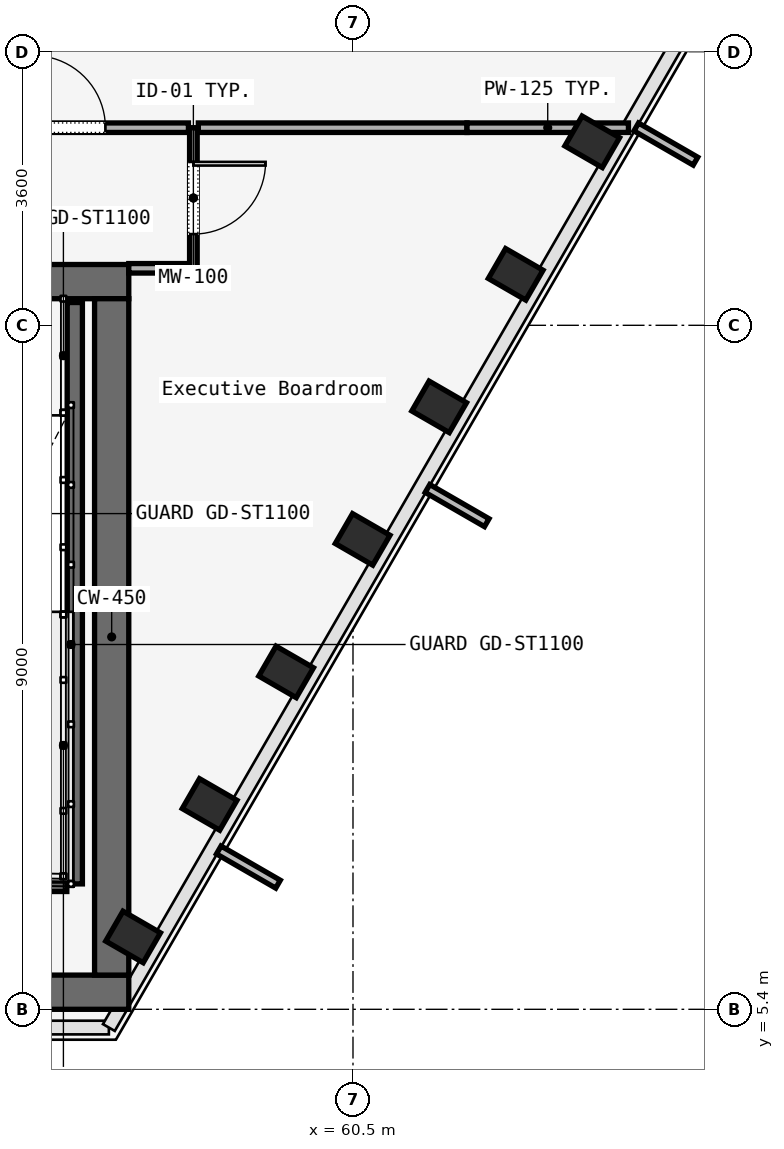
"""IFC4 building model, lengths in metres.
Left out: names, types, materials, properties, quantities, classifications, styles, units other than length and angle.
Written with IfcOpenShell. Run it as: python <this file> out.ifc"""

import sys

from ifc_helpers import new_model, si_unit, direction, frame, frame_2d, origin, origin_2d, place, context, subcontext, project, spatial, rectangle, i_section, extrude, element, fill, save


model = new_model("IFC4")
c1 = context("Model", 3, precision=1e-05, world=origin(), true_north=direction((0.0, 1.0)))
c2 = subcontext(c1, "Body", "Model", "MODEL_VIEW")
j1 = project(units=[si_unit("LENGTHUNIT", "METRE"), si_unit("PLANEANGLEUNIT", "RADIAN")], contexts=[c1])
p1 = place(None, origin())
s1 = spatial("IfcSite", under=j1, at=p1, CompositionType="ELEMENT")
p2 = place(p1, origin())
s2 = spatial("IfcBuilding", under=s1, at=p2, CompositionType="ELEMENT")
p3 = place(p2, frame((0.0, 0.0, 43.6)))
s3 = spatial("IfcBuildingStorey", under=s2, at=p3, CompositionType="ELEMENT", Elevation=43.6)
p4 = place(p3, frame((26.45, 14.975, 0.0), z_axis=(0.0, 0.0, 1.0), x_axis=(1.0, 0.0, 0.0)))
e1 = element("IfcWall", 1, at=p4, inside=s3, PredefinedType="SOLIDWALL", context=c2, shape_type="SweptSolid", body=[
    extrude(rectangle(XDim=31.1, YDim=0.45, at=frame_2d((15.55, 0.0))), origin(), (0.0, 0.0, 1.0), 3.58),
])
p5 = place(p4, frame((1.65, 0.0, 0.0)))
e2 = element("IfcOpeningElement", 2, at=p5, cuts=e1, PredefinedType="OPENING", context=c2, shape_type="SweptSolid", body=[
    extrude(rectangle(XDim=1.1, YDim=2.2, at=frame_2d((0.55, 1.1))), frame((0.0, 0.225, 0.0), z_axis=(0.0, -1.0, 0.0), x_axis=(1.0, 0.0, 0.0)), (0.0, 0.0, 1.0), 0.45),
])
p6 = place(p4, frame((13.65, 0.0, 0.0)))
e3 = element("IfcOpeningElement", 3, at=p6, cuts=e1, PredefinedType="OPENING", context=c2, shape_type="SweptSolid", body=[
    extrude(rectangle(XDim=1.1, YDim=2.2, at=frame_2d((0.55, 1.1))), frame((0.0, 0.225, 0.0), z_axis=(0.0, -1.0, 0.0), x_axis=(1.0, 0.0, 0.0)), (0.0, 0.0, 1.0), 0.45),
])
p7 = place(p4, frame((25.55, 0.0, 0.0)))
e4 = element("IfcOpeningElement", 4, at=p7, cuts=e1, PredefinedType="OPENING", context=c2, shape_type="SweptSolid", body=[
    extrude(rectangle(XDim=1.1, YDim=2.2, at=frame_2d((0.55, 1.1))), frame((0.0, 0.225, 0.0), z_axis=(0.0, -1.0, 0.0), x_axis=(1.0, 0.0, 0.0)), (0.0, 0.0, 1.0), 0.45),
])
p8 = place(p4, frame((10.7, 0.0, 0.0)))
e5 = element("IfcOpeningElement", 5, at=p8, cuts=e1, PredefinedType="OPENING", context=c2, shape_type="SweptSolid", body=[
    extrude(rectangle(XDim=1.4, YDim=2.2, at=frame_2d((0.7, 1.1))), frame((0.0, 0.225, 0.0), z_axis=(0.0, -1.0, 0.0), x_axis=(1.0, 0.0, 0.0)), (0.0, 0.0, 1.0), 0.45),
])
p9 = place(p4, frame((19.35, 0.0, 0.0)))
e6 = element("IfcOpeningElement", 6, at=p9, cuts=e1, PredefinedType="OPENING", context=c2, shape_type="SweptSolid", body=[
    extrude(rectangle(XDim=1.1, YDim=2.2, at=frame_2d((0.55, 1.1))), frame((0.0, 0.225, 0.0), z_axis=(0.0, -1.0, 0.0), x_axis=(1.0, 0.0, 0.0)), (0.0, 0.0, 1.0), 0.45),
])
p10 = place(p4, frame((21.4, 0.0, 0.0)))
e7 = element("IfcOpeningElement", 7, at=p10, cuts=e1, PredefinedType="OPENING", context=c2, shape_type="SweptSolid", body=[
    extrude(rectangle(XDim=0.9, YDim=2.1, at=frame_2d((0.45, 1.05))), frame((0.0, 0.225, 0.0), z_axis=(0.0, -1.0, 0.0), x_axis=(1.0, 0.0, 0.0)), (0.0, 0.0, 1.0), 0.45),
])
p11 = place(p4, frame((23.35, 0.0, 0.0)))
e8 = element("IfcOpeningElement", 8, at=p11, cuts=e1, PredefinedType="OPENING", context=c2, shape_type="SweptSolid", body=[
    extrude(rectangle(XDim=1.3, YDim=2.3, at=frame_2d((0.65, 1.15))), frame((0.0, 0.225, 0.0), z_axis=(0.0, -1.0, 0.0), x_axis=(1.0, 0.0, 0.0)), (0.0, 0.0, 1.0), 0.45),
])
p12 = place(p3, frame((26.45, 5.625, 0.0), z_axis=(0.0, 0.0, 1.0), x_axis=(1.0, 0.0, 0.0)))
e9 = element("IfcWall", 9, at=p12, inside=s3, PredefinedType="SOLIDWALL", context=c2, shape_type="SweptSolid", body=[
    extrude(rectangle(XDim=31.1, YDim=0.45, at=frame_2d((15.55, 0.0))), origin(), (0.0, 0.0, 1.0), 3.58),
])
p13 = place(p3, frame((57.325, 5.85, 0.0), z_axis=(0.0, 0.0, 1.0), x_axis=(0.0, 1.0, 0.0)))
e10 = element("IfcWall", 10, at=p13, inside=s3, PredefinedType="SOLIDWALL", context=c2, shape_type="SweptSolid", body=[
    extrude(rectangle(XDim=8.9, YDim=0.45, at=frame_2d((4.45, 0.0))), origin(), (0.0, 0.0, 1.0), 3.58),
])
p14 = place(p3, frame((57.607, 6.352, 0.0), z_axis=(0.049518600028, -0.006811361764, 0.998749975521), x_axis=(-0.78874036788, 0.613200429939, 0.043288160025)))
e11 = element("IfcColumn", 11, at=p14, inside=s3, PredefinedType="COLUMN", context=c2, shape_type="SweptSolid", body=[
    extrude(i_section(OverallWidth=0.454, OverallDepth=0.569, WebThickness=0.078, FlangeThickness=0.08, FilletRadius=0.015, at=origin_2d()), origin(), (0.0, 0.0, 1.0), 3.584),
])
p15 = place(p3, frame((58.614, 8.096, 0.0), z_axis=(0.041692690137, -0.020437593205, 0.998921430531), x_axis=(-0.556704828438, 0.829736555946, 0.040211711232)))
e12 = element("IfcColumn", 12, at=p15, inside=s3, PredefinedType="COLUMN", context=c2, shape_type="SweptSolid", body=[
    extrude(i_section(OverallWidth=0.454, OverallDepth=0.569, WebThickness=0.078, FlangeThickness=0.08, FilletRadius=0.015, at=origin_2d()), origin(), (0.0, 0.0, 1.0), 3.584),
])
p16 = place(p3, frame((59.62, 9.839, 0.0), z_axis=(0.033855728951, -0.034060089488, 0.998846184315), x_axis=(-0.255206953934, 0.965991555659, 0.041589963441)))
e13 = element("IfcColumn", 13, at=p16, inside=s3, PredefinedType="COLUMN", context=c2, shape_type="SweptSolid", body=[
    extrude(i_section(OverallWidth=0.454, OverallDepth=0.569, WebThickness=0.078, FlangeThickness=0.08, FilletRadius=0.015, at=origin_2d()), origin(), (0.0, 0.0, 1.0), 3.584),
])
p17 = place(p3, frame((60.627, 11.583, 0.0), z_axis=(0.025945557191, -0.047600904137, 0.998529409676), x_axis=(0.025159853701, 0.998580351425, 0.046949584763)))
e14 = element("IfcColumn", 14, at=p17, inside=s3, PredefinedType="COLUMN", context=c2, shape_type="SweptSolid", body=[
    extrude(i_section(OverallWidth=0.454, OverallDepth=0.569, WebThickness=0.078, FlangeThickness=0.08, FilletRadius=0.015, at=origin_2d()), origin(), (0.0, 0.0, 1.0), 3.585),
])
p18 = place(p3, frame((61.634, 13.327, 0.0), z_axis=(0.018103855794, -0.061253647423, 0.997958035732), x_axis=(0.234534805675, 0.970532640224, 0.055315632401)))
e15 = element("IfcColumn", 15, at=p18, inside=s3, PredefinedType="COLUMN", context=c2, shape_type="SweptSolid", body=[
    extrude(i_section(OverallWidth=0.454, OverallDepth=0.569, WebThickness=0.078, FlangeThickness=0.08, FilletRadius=0.015, at=origin_2d()), origin(), (0.0, 0.0, 1.0), 3.587),
])
p19 = place(p3, frame((62.641, 15.071, 0.0), z_axis=(0.010200686453, -0.074737029415, 0.997151103108), x_axis=(0.378624510243, 0.923242233688, 0.065324254129)))
e16 = element("IfcColumn", 16, at=p19, inside=s3, PredefinedType="COLUMN", context=c2, shape_type="SweptSolid", body=[
    extrude(i_section(OverallWidth=0.454, OverallDepth=0.569, WebThickness=0.078, FlangeThickness=0.08, FilletRadius=0.015, at=origin_2d()), origin(), (0.0, 0.0, 1.0), 3.59),
])
p20 = place(p3, frame((63.647, 16.814, 0.0), z_axis=(0.002377627447, -0.088311876593, 0.99609003576), x_axis=(0.476602394605, 0.875783464655, 0.076508042027)))
e17 = element("IfcColumn", 17, at=p20, inside=s3, PredefinedType="COLUMN", context=c2, shape_type="SweptSolid", body=[
    extrude(i_section(OverallWidth=0.454, OverallDepth=0.569, WebThickness=0.078, FlangeThickness=0.08, FilletRadius=0.015, at=origin_2d()), origin(), (0.0, 0.0, 1.0), 3.594),
])
p21 = place(p3, frame((64.654, 18.558, 0.0), z_axis=(-0.005427503727, -0.101765694887, 0.994793589418), x_axis=(0.545172741525, 0.833665038285, 0.088256930829)))
e18 = element("IfcColumn", 18, at=p21, inside=s3, PredefinedType="COLUMN", context=c2, shape_type="SweptSolid", body=[
    extrude(i_section(OverallWidth=0.454, OverallDepth=0.569, WebThickness=0.078, FlangeThickness=0.08, FilletRadius=0.015, at=origin_2d()), origin(), (0.0, 0.0, 1.0), 3.599),
])
p22 = place(p3, frame((56.84, 14.7, 0.0), z_axis=(0.0, 0.0, 1.0), x_axis=(0.0, -1.0, 0.0)))
e19 = element("IfcWall", 19, at=p22, inside=s3, PredefinedType="SOLIDWALL", context=c2, shape_type="SweptSolid", body=[
    extrude(rectangle(XDim=7.65, YDim=0.2, at=frame_2d((3.825, 0.0))), origin(), (0.0, 0.0, 1.0), 3.8),
])
p23 = place(p3, frame((53.62, 7.05, 0.0), z_axis=(0.0, 0.0, 1.0), x_axis=(1.0, 0.0, 0.0)))
e20 = element("IfcWall", 20, at=p23, inside=s3, PredefinedType="SOLIDWALL", context=c2, shape_type="SweptSolid", body=[
    extrude(rectangle(XDim=3.115, YDim=0.2, at=frame_2d((1.558, 0.0))), origin(), (0.0, 0.0, 1.0), 3.8),
])
p24 = place(p3, frame((58.4, 17.0, 0.0), z_axis=(0.0, 0.0, 1.0), x_axis=(0.0, -1.0, 0.0)))
e21 = element("IfcWall", 21, at=p24, inside=s3, PredefinedType="MOVABLE", context=c2, shape_type="SweptSolid", body=[
    extrude(rectangle(XDim=1.85, YDim=0.1, at=frame_2d((0.925, 0.0))), origin(), (0.0, 0.0, 1.0), 2.933),
])
p25 = place(p24, frame((0.45, 0.0, 0.0)))
e22 = element("IfcOpeningElement", 22, at=p25, cuts=e21, PredefinedType="OPENING", context=c2, shape_type="SweptSolid", body=[
    extrude(rectangle(XDim=0.95, YDim=2.2, at=frame_2d((0.475, 1.1))), frame((0.0, 0.05, 0.0), z_axis=(0.0, -1.0, 0.0), x_axis=(1.0, 0.0, 0.0)), (0.0, 0.0, 1.0), 0.1),
])
p26 = place(p3, frame((58.335, 15.15, 0.0), z_axis=(0.0, 0.0, 1.0), x_axis=(-1.0, 0.0, 0.0)))
e23 = element("IfcWall", 23, at=p26, inside=s3, PredefinedType="PARTITIONING", context=c2, shape_type="SweptSolid", body=[
    extrude(rectangle(XDim=0.785, YDim=0.125, at=frame_2d((0.393, 0.0))), origin(), (0.0, 0.0, 1.0), 2.933),
])
p27 = place(p3, frame((55.2, 17.0, 0.0), z_axis=(0.0, 0.0, 1.0), x_axis=(1.0, 0.0, 0.0)))
e24 = element("IfcWall", 24, at=p27, inside=s3, PredefinedType="PARTITIONING", context=c2, shape_type="SweptSolid", body=[
    extrude(rectangle(XDim=3.135, YDim=0.125, at=frame_2d((1.567, 0.0))), origin(), (0.0, 0.0, 1.0), 2.933),
])
p28 = place(p27, frame((1.093, 0.0, 0.0)))
e25 = element("IfcOpeningElement", 25, at=p28, cuts=e24, PredefinedType="OPENING", context=c2, shape_type="SweptSolid", body=[
    extrude(rectangle(XDim=0.95, YDim=2.2, at=frame_2d((0.475, 1.1))), frame((0.0, 0.062, 0.0), z_axis=(0.0, -1.0, 0.0), x_axis=(1.0, 0.0, 0.0)), (0.0, 0.0, 1.0), 0.125),
])
p29 = place(p3, frame((58.465, 17.0, 0.0), z_axis=(0.0, 0.0, 1.0), x_axis=(1.0, 0.0, 0.0)))
e26 = element("IfcWall", 26, at=p29, inside=s3, PredefinedType="PARTITIONING", context=c2, shape_type="SweptSolid", body=[
    extrude(rectangle(XDim=3.535, YDim=0.125, at=frame_2d((1.768, 0.0))), origin(), (0.0, 0.0, 1.0), 2.933),
])
p30 = place(p3, frame((62.0, 17.0, 0.0), z_axis=(0.0, 0.0, 1.0), x_axis=(1.0, 0.0, 0.0)))
e27 = element("IfcWall", 27, at=p30, inside=s3, PredefinedType="PARTITIONING", context=c2, shape_type="SweptSolid", body=[
    extrude(rectangle(XDim=2.124, YDim=0.125, at=frame_2d((1.062, 0.0))), origin(), (0.0, 0.0, 1.0), 2.933),
])
p31 = place(p25, origin())
e28 = element("IfcDoor", 28, at=p31, inside=s3, OperationType="SINGLE_SWING_RIGHT", PredefinedType="DOOR", context=c2, shape_type="SweptSolid", body=[
    extrude(rectangle(XDim=0.95, YDim=2.2, at=frame_2d((0.475, 1.1))), frame((0.0, 0.025, 0.0), z_axis=(0.0, -1.0, 0.0), x_axis=(1.0, 0.0, 0.0)), (0.0, 0.0, 1.0), 0.05),
])
fill(e22, e28)
p32 = place(p28, origin())
e29 = element("IfcDoor", 29, at=p32, inside=s3, OperationType="SINGLE_SWING_LEFT", PredefinedType="DOOR", context=c2, shape_type="SweptSolid", body=[
    extrude(rectangle(XDim=0.95, YDim=2.2, at=frame_2d((0.475, 1.1))), frame((0.0, 0.025, 0.0), z_axis=(0.0, -1.0, 0.0), x_axis=(1.0, 0.0, 0.0)), (0.0, 0.0, 1.0), 0.05),
])
fill(e25, e29)
save(model, sys.argv[1])
